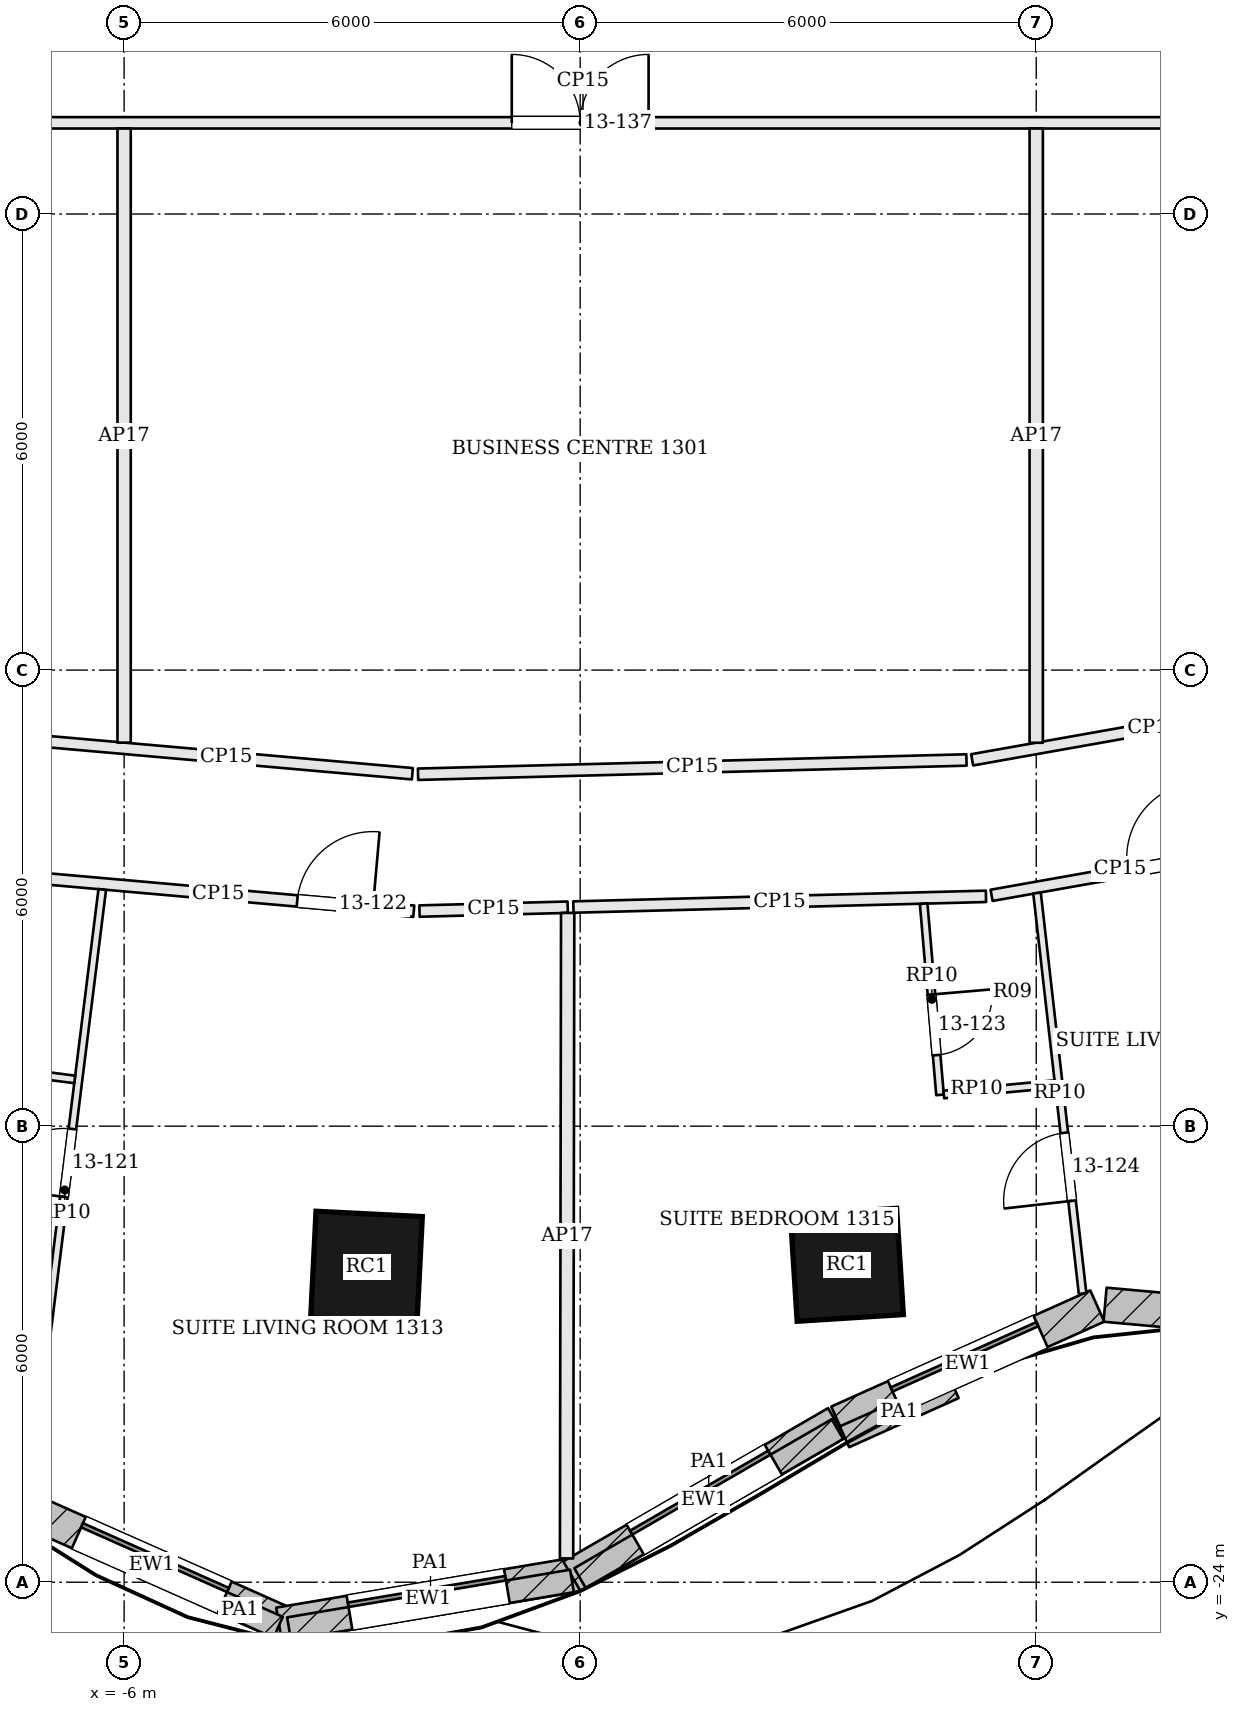
"""IFC4 building model, lengths in metres.
Left out: names, types, materials, properties, quantities, classifications, styles, units other than length and angle.
Written with IfcOpenShell. Run it as: python <this file> out.ifc"""

import sys

from ifc_helpers import new_model, si_unit, direction, frame, frame_2d, origin, origin_2d, place, context, subcontext, project, spatial, rectangle, extrude, element, fill, save


model = new_model("IFC4")
c1 = context("Model", 3, precision=1e-05, world=origin(), true_north=direction((0.0, 1.0)))
c2 = subcontext(c1, "Body", "Model", "MODEL_VIEW")
j1 = project(units=[si_unit("LENGTHUNIT", "METRE"), si_unit("PLANEANGLEUNIT", "RADIAN")], contexts=[c1])
p1 = place(None, origin())
s1 = spatial("IfcSite", under=j1, at=p1, CompositionType="ELEMENT")
p2 = place(p1, origin())
s2 = spatial("IfcBuilding", under=s1, at=p2, CompositionType="ELEMENT")
p3 = place(p2, frame((0.0, 0.0, 62.7)))
s3 = spatial("IfcBuildingStorey", under=s2, at=p3, CompositionType="ELEMENT", Elevation=62.7)
for number, where, z_axis, x_axis in (
    (1, (-2.811, -19.854, 0.0), (0.0, 0.0, 1.0), (0.999, -0.05, 0.0)),
    (2, (3.509, -19.824, 0.0), (0.0, 0.0, 1.0), (0.998, 0.063, 0.0)),
):
    element("IfcColumn", number, at=place(p3, frame(where, z_axis=z_axis, x_axis=x_axis)), inside=s3, PredefinedType="COLUMN", context=c2, shape_type="SweptSolid", body=[
        extrude(rectangle(XDim=1.4, YDim=1.4, at=origin_2d()), origin(), (0.0, 0.0, 1.0), 3.6),
    ])
p4 = place(p3, frame((-7.44, -22.972, 0.0), z_axis=(0.0, 0.0, 1.0), x_axis=(0.914114918534, -0.405455195692, 0.0)))
e3 = element("IfcWall", 3, at=p4, inside=s3, PredefinedType="SOLIDWALL", context=c2, shape_type="SweptSolid", body=[
    extrude(rectangle(XDim=3.946, YDim=0.45, at=frame_2d((1.973, 0.0))), origin(), (0.0, 0.0, 1.0), 3.4),
])
p5 = place(p4, frame((0.923, 0.0, 0.9)))
e4 = element("IfcOpeningElement", 4, at=p5, cuts=e3, PredefinedType="OPENING", context=c2, shape_type="SweptSolid", body=[
    extrude(rectangle(XDim=2.1, YDim=2.0, at=frame_2d((1.05, 1.0))), frame((0.0, 0.235, 0.0), z_axis=(0.0, -1.0, 0.0), x_axis=(1.0, 0.0, 0.0)), (0.0, 0.0, 1.0), 0.47),
])
p6 = place(p3, frame((-3.961, -24.556, 0.0), z_axis=(0.0, 0.0, 1.0), x_axis=(0.986102211406, 0.166139786505, 0.0)))
e5 = element("IfcWall", 5, at=p6, inside=s3, PredefinedType="SOLIDWALL", context=c2, shape_type="SweptSolid", body=[
    extrude(rectangle(XDim=3.979, YDim=0.45, at=frame_2d((1.99, 0.0))), origin(), (0.0, 0.0, 1.0), 3.4),
])
p7 = place(p6, frame((0.94, 0.0, 0.9)))
e6 = element("IfcOpeningElement", 6, at=p7, cuts=e5, PredefinedType="OPENING", context=c2, shape_type="SweptSolid", body=[
    extrude(rectangle(XDim=2.1, YDim=2.0, at=frame_2d((1.05, 1.0))), frame((0.0, 0.235, 0.0), z_axis=(0.0, -1.0, 0.0), x_axis=(1.0, 0.0, 0.0)), (0.0, 0.0, 1.0), 0.47),
])
p8 = place(p3, frame((-0.109, -23.92, 0.0), z_axis=(0.0, 0.0, 1.0), x_axis=(0.865557769603, 0.500809092848, 0.0)))
e7 = element("IfcWall", 7, at=p8, inside=s3, PredefinedType="SOLIDWALL", context=c2, shape_type="SweptSolid", body=[
    extrude(rectangle(XDim=4.025, YDim=0.45, at=frame_2d((2.012, 0.0))), origin(), (0.0, 0.0, 1.0), 3.4),
])
p9 = place(p8, frame((0.962, 0.0, 0.9)))
e8 = element("IfcOpeningElement", 8, at=p9, cuts=e7, PredefinedType="OPENING", context=c2, shape_type="SweptSolid", body=[
    extrude(rectangle(XDim=2.1, YDim=2.0, at=frame_2d((1.05, 1.0))), frame((0.0, 0.235, 0.0), z_axis=(0.0, -1.0, 0.0), x_axis=(1.0, 0.0, 0.0)), (0.0, 0.0, 1.0), 0.47),
])
p10 = place(p3, frame((3.395, -21.894, 0.0), z_axis=(0.0, 0.0, 1.0), x_axis=(0.912496703183, 0.409084058208, 0.0)))
e9 = element("IfcWall", 9, at=p10, inside=s3, PredefinedType="SOLIDWALL", context=c2, shape_type="SweptSolid", body=[
    extrude(rectangle(XDim=3.735, YDim=0.45, at=frame_2d((1.867, 0.0))), origin(), (0.0, 0.0, 1.0), 3.4),
])
p11 = place(p10, frame((0.817, 0.0, 0.9)))
e10 = element("IfcOpeningElement", 10, at=p11, cuts=e9, PredefinedType="OPENING", context=c2, shape_type="SweptSolid", body=[
    extrude(rectangle(XDim=2.1, YDim=2.0, at=frame_2d((1.05, 1.0))), frame((0.0, 0.235, 0.0), z_axis=(0.0, -1.0, 0.0), x_axis=(1.0, 0.0, 0.0)), (0.0, 0.0, 1.0), 0.47),
])
p12 = place(p3, frame((6.906, -20.349, 0.0), z_axis=(0.0, 0.0, 1.0), x_axis=(0.995947174038, -0.089940127451, 0.0)))
e11 = element("IfcWall", 11, at=p12, inside=s3, PredefinedType="SOLIDWALL", context=c2, shape_type="SweptSolid", body=[
    extrude(rectangle(XDim=3.844, YDim=0.45, at=frame_2d((1.922, 0.0))), origin(), (0.0, 0.0, 1.0), 3.4),
])
p13 = place(p12, frame((0.872, 0.0, 0.9)))
e12 = element("IfcOpeningElement", 12, at=p13, cuts=e11, PredefinedType="OPENING", context=c2, shape_type="SweptSolid", body=[
    extrude(rectangle(XDim=2.1, YDim=2.0, at=frame_2d((1.05, 1.0))), frame((0.0, 0.235, 0.0), z_axis=(0.0, -1.0, 0.0), x_axis=(1.0, 0.0, 0.0)), (0.0, 0.0, 1.0), 0.47),
])
p14 = place(p3, frame((-4.979, -24.146, 3.6), z_axis=(0.0, 0.0, 1.0), x_axis=(0.91414047558, -0.405397571412, 0.0)))
e13 = element("IfcWall", 13, at=p14, inside=s3, PredefinedType="PARAPET", context=c2, shape_type="SweptSolid", body=[
    extrude(rectangle(XDim=1.101, YDim=0.3, at=frame_2d((0.55, 0.0))), origin(), (0.0, 0.0, 1.0), 1.1),
])
p15 = place(p3, frame((-3.83, -24.61, 3.6), z_axis=(0.0, 0.0, 1.0), x_axis=(0.986111051666, 0.166087307712, 0.0)))
e14 = element("IfcWall", 14, at=p15, inside=s3, PredefinedType="PARAPET", context=c2, shape_type="SweptSolid", body=[
    extrude(rectangle(XDim=3.775, YDim=0.3, at=frame_2d((1.887, 0.0))), origin(), (0.0, 0.0, 1.0), 1.1),
])
p16 = place(p3, frame((-0.002, -23.945, 3.6), z_axis=(0.0, 0.0, 1.0), x_axis=(0.865550152763, 0.500822256945, 0.0)))
e15 = element("IfcWall", 15, at=p16, inside=s3, PredefinedType="PARAPET", context=c2, shape_type="SweptSolid", body=[
    extrude(rectangle(XDim=3.913, YDim=0.3, at=frame_2d((1.956, 0.0))), origin(), (0.0, 0.0, 1.0), 1.1),
])
p17 = place(p3, frame((3.478, -22.087, 3.6), z_axis=(0.0, 0.0, 1.0), x_axis=(0.91246752391, 0.409149138835, 0.0)))
e16 = element("IfcWall", 16, at=p17, inside=s3, PredefinedType="PARAPET", context=c2, shape_type="SweptSolid", body=[
    extrude(rectangle(XDim=1.579, YDim=0.3, at=frame_2d((0.79, 0.0))), origin(), (0.0, 0.0, 1.0), 1.1),
])
p18 = place(p3, frame((-7.331, -14.719, 0.0), z_axis=(0.0, 0.0, 1.0), x_axis=(0.996139466017, -0.087784760882, 0.0)))
e17 = element("IfcWall", 17, at=p18, inside=s3, PredefinedType="PARTITIONING", context=c2, shape_type="SweptSolid", body=[
    extrude(rectangle(XDim=5.162, YDim=0.15, at=frame_2d((2.581, 0.0))), origin(), (0.0, 0.0, 1.0), 2.68),
])
p19 = place(p18, frame((3.622, 0.0, 0.0)))
e18 = element("IfcOpeningElement", 18, at=p19, cuts=e17, PredefinedType="OPENING", context=c2, shape_type="SweptSolid", body=[
    extrude(rectangle(XDim=1.0, YDim=2.1, at=frame_2d((0.5, 1.05))), frame((0.0, 0.085, 0.0), z_axis=(0.0, -1.0, 0.0), x_axis=(1.0, 0.0, 0.0)), (0.0, 0.0, 1.0), 0.17),
])
p20 = place(p3, frame((-2.114, -15.17, 0.0), z_axis=(0.0, 0.0, 1.0), x_axis=(0.999660986361, 0.026036749958, 0.0)))
e19 = element("IfcWall", 19, at=p20, inside=s3, PredefinedType="PARTITIONING", context=c2, shape_type="SweptSolid", body=[
    extrude(rectangle(XDim=1.95, YDim=0.15, at=frame_2d((0.975, 0.0))), origin(), (0.0, 0.0, 1.0), 2.68),
])
p21 = place(p3, frame((-0.179, -23.687, 0.0), z_axis=(0.0, 0.0, 1.0), x_axis=(0.001753677156, 0.999998462307, 0.0)))
e20 = element("IfcWall", 20, at=p21, inside=s3, PredefinedType="PARTITIONING", context=c2, shape_type="SweptSolid", body=[
    extrude(rectangle(XDim=8.492, YDim=0.175, at=frame_2d((4.246, 0.0))), origin(), (0.0, 0.0, 1.0), 2.68),
])
p22 = place(p3, frame((-0.089, -15.117, 0.0), z_axis=(0.0, 0.0, 1.0), x_axis=(0.999662208654, 0.025989778545, 0.0)))
e21 = element("IfcWall", 21, at=p22, inside=s3, PredefinedType="PARTITIONING", context=c2, shape_type="SweptSolid", body=[
    extrude(rectangle(XDim=5.43, YDim=0.15, at=frame_2d((2.715, 0.0))), origin(), (0.0, 0.0, 1.0), 2.68),
])
p23 = place(p3, frame((5.413, -14.963, 0.0), z_axis=(0.0, 0.0, 1.0), x_axis=(0.984633650787, 0.17463268233, 0.0)))
e22 = element("IfcWall", 22, at=p23, inside=s3, PredefinedType="PARTITIONING", context=c2, shape_type="SweptSolid", body=[
    extrude(rectangle(XDim=4.043, YDim=0.15, at=frame_2d((2.021, 0.0))), origin(), (0.0, 0.0, 1.0), 2.68),
])
p24 = place(p23, frame((1.821, 0.0, 0.0)))
e23 = element("IfcOpeningElement", 23, at=p24, cuts=e22, PredefinedType="OPENING", context=c2, shape_type="SweptSolid", body=[
    extrude(rectangle(XDim=1.0, YDim=2.1, at=frame_2d((0.5, 1.05))), frame((0.0, 0.085, 0.0), z_axis=(0.0, -1.0, 0.0), x_axis=(1.0, 0.0, 0.0)), (0.0, 0.0, 1.0), 0.17),
])
p25 = place(p3, frame((9.93, -12.334, 0.0), z_axis=(0.0, 0.0, 1.0), x_axis=(-0.984638212434, -0.174606960386, 0.0)))
e24 = element("IfcWall", 24, at=p25, inside=s3, PredefinedType="PARTITIONING", context=c2, shape_type="SweptSolid", body=[
    extrude(rectangle(XDim=4.848, YDim=0.15, at=frame_2d((2.424, 0.0))), origin(), (0.0, 0.0, 1.0), 2.68),
])
p26 = place(p3, frame((5.082, -13.182, 0.0), z_axis=(0.0, 0.0, 1.0), x_axis=(-0.999661624383, -0.026012242045, 0.0)))
e25 = element("IfcWall", 25, at=p26, inside=s3, PredefinedType="PARTITIONING", context=c2, shape_type="SweptSolid", body=[
    extrude(rectangle(XDim=7.218, YDim=0.15, at=frame_2d((3.609, 0.0))), origin(), (0.0, 0.0, 1.0), 2.68),
])
p27 = place(p3, frame((-2.208, -13.364, 0.0), z_axis=(0.0, 0.0, 1.0), x_axis=(-0.996134962793, 0.087835846335, 0.0)))
e26 = element("IfcWall", 26, at=p27, inside=s3, PredefinedType="PARTITIONING", context=c2, shape_type="SweptSolid", body=[
    extrude(rectangle(XDim=4.917, YDim=0.15, at=frame_2d((2.458, 0.0))), origin(), (0.0, 0.0, 1.0), 2.68),
])
p28 = place(p3, frame((-14.725, -4.8, 0.0), z_axis=(0.0, 0.0, 1.0), x_axis=(1.0, 0.0, 0.0)))
e27 = element("IfcWall", 27, at=p28, inside=s3, PredefinedType="PARTITIONING", context=c2, shape_type="SweptSolid", body=[
    extrude(rectangle(XDim=29.525, YDim=0.15, at=frame_2d((14.763, 0.0))), origin(), (0.0, 0.0, 1.0), 2.68),
])
p29 = place(p28, frame((3.425, 0.0, 0.0)))
e28 = element("IfcOpeningElement", 28, at=p29, cuts=e27, PredefinedType="OPENING", context=c2, shape_type="SweptSolid", body=[
    extrude(rectangle(XDim=1.8, YDim=2.1, at=frame_2d((0.9, 1.05))), frame((0.0, 0.085, 0.0), z_axis=(0.0, -1.0, 0.0), x_axis=(1.0, 0.0, 0.0)), (0.0, 0.0, 1.0), 0.17),
])
p30 = place(p28, frame((13.825, 0.0, 0.0)))
e29 = element("IfcOpeningElement", 29, at=p30, cuts=e27, PredefinedType="OPENING", context=c2, shape_type="SweptSolid", body=[
    extrude(rectangle(XDim=1.8, YDim=2.1, at=frame_2d((0.9, 1.05))), frame((0.0, 0.085, 0.0), z_axis=(0.0, -1.0, 0.0), x_axis=(1.0, 0.0, 0.0)), (0.0, 0.0, 1.0), 0.17),
])
p31 = place(p28, frame((24.225, 0.0, 0.0)))
e30 = element("IfcOpeningElement", 30, at=p31, cuts=e27, PredefinedType="OPENING", context=c2, shape_type="SweptSolid", body=[
    extrude(rectangle(XDim=1.8, YDim=2.1, at=frame_2d((0.9, 1.05))), frame((0.0, 0.085, 0.0), z_axis=(0.0, -1.0, 0.0), x_axis=(1.0, 0.0, 0.0)), (0.0, 0.0, 1.0), 0.17),
])
p32 = place(p3, frame((-7.275, -22.795, 0.0), z_axis=(0.0, 0.0, 1.0), x_axis=(0.123872623133, 0.992298127197, 0.0)))
e31 = element("IfcWall", 31, at=p32, inside=s3, PredefinedType="PARTITIONING", context=c2, shape_type="SweptSolid", body=[
    extrude(rectangle(XDim=7.97, YDim=0.1, at=frame_2d((3.985, 0.0))), origin(), (0.0, 0.0, 1.0), 2.68),
])
p33 = place(p32, frame((3.895, 0.0, 0.0)))
e32 = element("IfcOpeningElement", 32, at=p33, cuts=e31, PredefinedType="OPENING", context=c2, shape_type="SweptSolid", body=[
    extrude(rectangle(XDim=0.9, YDim=2.4, at=frame_2d((0.45, 1.2))), frame((0.0, 0.06, 0.0), z_axis=(0.0, -1.0, 0.0), x_axis=(1.0, 0.0, 0.0)), (0.0, 0.0, 1.0), 0.12),
])
p34 = place(p3, frame((-8.164, -17.19, 0.0), z_axis=(0.0, 0.0, 1.0), x_axis=(0.991762801698, -0.128088036788, 0.0)))
e33 = element("IfcWall", 33, at=p34, inside=s3, PredefinedType="PARTITIONING", context=c2, shape_type="SweptSolid", body=[
    extrude(rectangle(XDim=1.527, YDim=0.1, at=frame_2d((0.763, 0.0))), origin(), (0.0, 0.0, 1.0), 2.68),
])
p35 = place(p3, frame((6.61, -20.202, 0.0), z_axis=(0.0, 0.0, 1.0), x_axis=(-0.113018145239, 0.993592924113, 0.0)))
e34 = element("IfcWall", 34, at=p35, inside=s3, PredefinedType="PARTITIONING", context=c2, shape_type="SweptSolid", body=[
    extrude(rectangle(XDim=5.303, YDim=0.1, at=frame_2d((2.652, 0.0))), origin(), (0.0, 0.0, 1.0), 2.68),
])
p36 = place(p35, frame((1.228, 0.0, 0.0)))
e35 = element("IfcOpeningElement", 35, at=p36, cuts=e34, PredefinedType="OPENING", context=c2, shape_type="SweptSolid", body=[
    extrude(rectangle(XDim=0.9, YDim=2.4, at=frame_2d((0.45, 1.2))), frame((0.0, 0.06, 0.0), z_axis=(0.0, -1.0, 0.0), x_axis=(1.0, 0.0, 0.0)), (0.0, 0.0, 1.0), 0.12),
])
p37 = place(p3, frame((4.519, -15.073, 0.0), z_axis=(0.0, 0.0, 1.0), x_axis=(0.085277735772, -0.996357218964, 0.0)))
e36 = element("IfcWall", 36, at=p37, inside=s3, PredefinedType="PARTITIONING", context=c2, shape_type="SweptSolid", body=[
    extrude(rectangle(XDim=2.525, YDim=0.1, at=frame_2d((1.263, 0.0))), origin(), (0.0, 0.0, 1.0), 2.68),
])
p38 = place(p37, frame((1.2, 0.0, 0.0)))
e37 = element("IfcOpeningElement", 37, at=p38, cuts=e36, PredefinedType="OPENING", context=c2, shape_type="SweptSolid", body=[
    extrude(rectangle(XDim=0.8, YDim=2.1, at=frame_2d((0.4, 1.05))), frame((0.0, 0.06, 0.0), z_axis=(0.0, -1.0, 0.0), x_axis=(1.0, 0.0, 0.0)), (0.0, 0.0, 1.0), 0.12),
])
p39 = place(p3, frame((4.784, -17.583, 0.0), z_axis=(0.0, 0.0, 1.0), x_axis=(0.995655447425, 0.093114069899, 0.0)))
e38 = element("IfcWall", 38, at=p39, inside=s3, PredefinedType="PARTITIONING", context=c2, shape_type="SweptSolid", body=[
    extrude(rectangle(XDim=1.468, YDim=0.1, at=frame_2d((0.734, 0.0))), origin(), (0.0, 0.0, 1.0), 2.68),
])
p40 = place(p3, frame((-6.0, -12.954, 0.0), z_axis=(0.0, 0.0, 1.0), x_axis=(0.0, 1.0, 0.0)))
e39 = element("IfcWall", 39, at=p40, inside=s3, PredefinedType="PARTITIONING", context=c2, shape_type="SweptSolid", body=[
    extrude(rectangle(XDim=8.079, YDim=0.175, at=frame_2d((4.04, 0.0))), origin(), (0.0, 0.0, 1.0), 2.68),
])
p41 = place(p3, frame((6.0, -12.956, 0.0), z_axis=(0.0, 0.0, 1.0), x_axis=(0.0, 1.0, 0.0)))
e40 = element("IfcWall", 40, at=p41, inside=s3, PredefinedType="PARTITIONING", context=c2, shape_type="SweptSolid", body=[
    extrude(rectangle(XDim=8.081, YDim=0.175, at=frame_2d((4.041, 0.0))), origin(), (0.0, 0.0, 1.0), 2.68),
])
p42 = place(p5, origin())
e41 = element("IfcWindow", 41, at=p42, inside=s3, PartitioningType="SINGLE_PANEL", PredefinedType="WINDOW", context=c2, shape_type="SweptSolid", body=[
    extrude(rectangle(XDim=2.1, YDim=2.0, at=frame_2d((1.05, 1.0))), frame((0.0, 0.135, 0.0), z_axis=(0.0, -1.0, 0.0), x_axis=(1.0, 0.0, 0.0)), (0.0, 0.0, 1.0), 0.06),
])
fill(e4, e41)
p43 = place(p7, origin())
e42 = element("IfcWindow", 42, at=p43, inside=s3, PartitioningType="SINGLE_PANEL", PredefinedType="WINDOW", context=c2, shape_type="SweptSolid", body=[
    extrude(rectangle(XDim=2.1, YDim=2.0, at=frame_2d((1.05, 1.0))), frame((0.0, 0.135, 0.0), z_axis=(0.0, -1.0, 0.0), x_axis=(1.0, 0.0, 0.0)), (0.0, 0.0, 1.0), 0.06),
])
fill(e6, e42)
p44 = place(p9, origin())
e43 = element("IfcWindow", 43, at=p44, inside=s3, PartitioningType="SINGLE_PANEL", PredefinedType="WINDOW", context=c2, shape_type="SweptSolid", body=[
    extrude(rectangle(XDim=2.1, YDim=2.0, at=frame_2d((1.05, 1.0))), frame((0.0, 0.135, 0.0), z_axis=(0.0, -1.0, 0.0), x_axis=(1.0, 0.0, 0.0)), (0.0, 0.0, 1.0), 0.06),
])
fill(e8, e43)
p45 = place(p11, origin())
e44 = element("IfcWindow", 44, at=p45, inside=s3, PartitioningType="SINGLE_PANEL", PredefinedType="WINDOW", context=c2, shape_type="SweptSolid", body=[
    extrude(rectangle(XDim=2.1, YDim=2.0, at=frame_2d((1.05, 1.0))), frame((0.0, 0.135, 0.0), z_axis=(0.0, -1.0, 0.0), x_axis=(1.0, 0.0, 0.0)), (0.0, 0.0, 1.0), 0.06),
])
fill(e10, e44)
p46 = place(p33, origin())
e45 = element("IfcDoor", 45, at=p46, inside=s3, OperationType="SINGLE_SWING_LEFT", PredefinedType="DOOR", context=c2, shape_type="SweptSolid", body=[
    extrude(rectangle(XDim=0.9, YDim=2.4, at=frame_2d((0.45, 1.2))), frame((0.0, 0.025, 0.0), z_axis=(0.0, -1.0, 0.0), x_axis=(1.0, 0.0, 0.0)), (0.0, 0.0, 1.0), 0.05),
])
fill(e32, e45)
p47 = place(p19, origin())
e46 = element("IfcDoor", 46, at=p47, inside=s3, OperationType="SINGLE_SWING_RIGHT", PredefinedType="DOOR", context=c2, shape_type="SweptSolid", body=[
    extrude(rectangle(XDim=1.0, YDim=2.1, at=frame_2d((0.5, 1.05))), frame((0.0, 0.025, 0.0), z_axis=(0.0, -1.0, 0.0), x_axis=(1.0, 0.0, 0.0)), (0.0, 0.0, 1.0), 0.05),
])
fill(e18, e46)
p48 = place(p38, origin())
e47 = element("IfcDoor", 47, at=p48, inside=s3, OperationType="SINGLE_SWING_LEFT", PredefinedType="DOOR", context=c2, shape_type="SweptSolid", body=[
    extrude(rectangle(XDim=0.8, YDim=2.1, at=frame_2d((0.4, 1.05))), frame((0.0, 0.025, 0.0), z_axis=(0.0, -1.0, 0.0), x_axis=(1.0, 0.0, 0.0)), (0.0, 0.0, 1.0), 0.05),
])
fill(e37, e47)
p49 = place(p36, origin())
e48 = element("IfcDoor", 48, at=p49, inside=s3, OperationType="SINGLE_SWING_LEFT", PredefinedType="DOOR", context=c2, shape_type="SweptSolid", body=[
    extrude(rectangle(XDim=0.9, YDim=2.4, at=frame_2d((0.45, 1.2))), frame((0.0, 0.025, 0.0), z_axis=(0.0, -1.0, 0.0), x_axis=(1.0, 0.0, 0.0)), (0.0, 0.0, 1.0), 0.05),
])
fill(e35, e48)
p50 = place(p24, origin())
e49 = element("IfcDoor", 49, at=p50, inside=s3, OperationType="SINGLE_SWING_RIGHT", PredefinedType="DOOR", context=c2, shape_type="SweptSolid", body=[
    extrude(rectangle(XDim=1.0, YDim=2.1, at=frame_2d((0.5, 1.05))), frame((0.0, 0.025, 0.0), z_axis=(0.0, -1.0, 0.0), x_axis=(1.0, 0.0, 0.0)), (0.0, 0.0, 1.0), 0.05),
])
fill(e23, e49)
p51 = place(p30, origin())
e50 = element("IfcDoor", 50, at=p51, inside=s3, OperationType="DOUBLE_DOOR_SINGLE_SWING", PredefinedType="DOOR", context=c2, shape_type="SweptSolid", body=[
    extrude(rectangle(XDim=1.8, YDim=2.1, at=frame_2d((0.9, 1.05))), frame((0.0, 0.025, 0.0), z_axis=(0.0, -1.0, 0.0), x_axis=(1.0, 0.0, 0.0)), (0.0, 0.0, 1.0), 0.05),
])
fill(e29, e50)
save(model, sys.argv[1])
